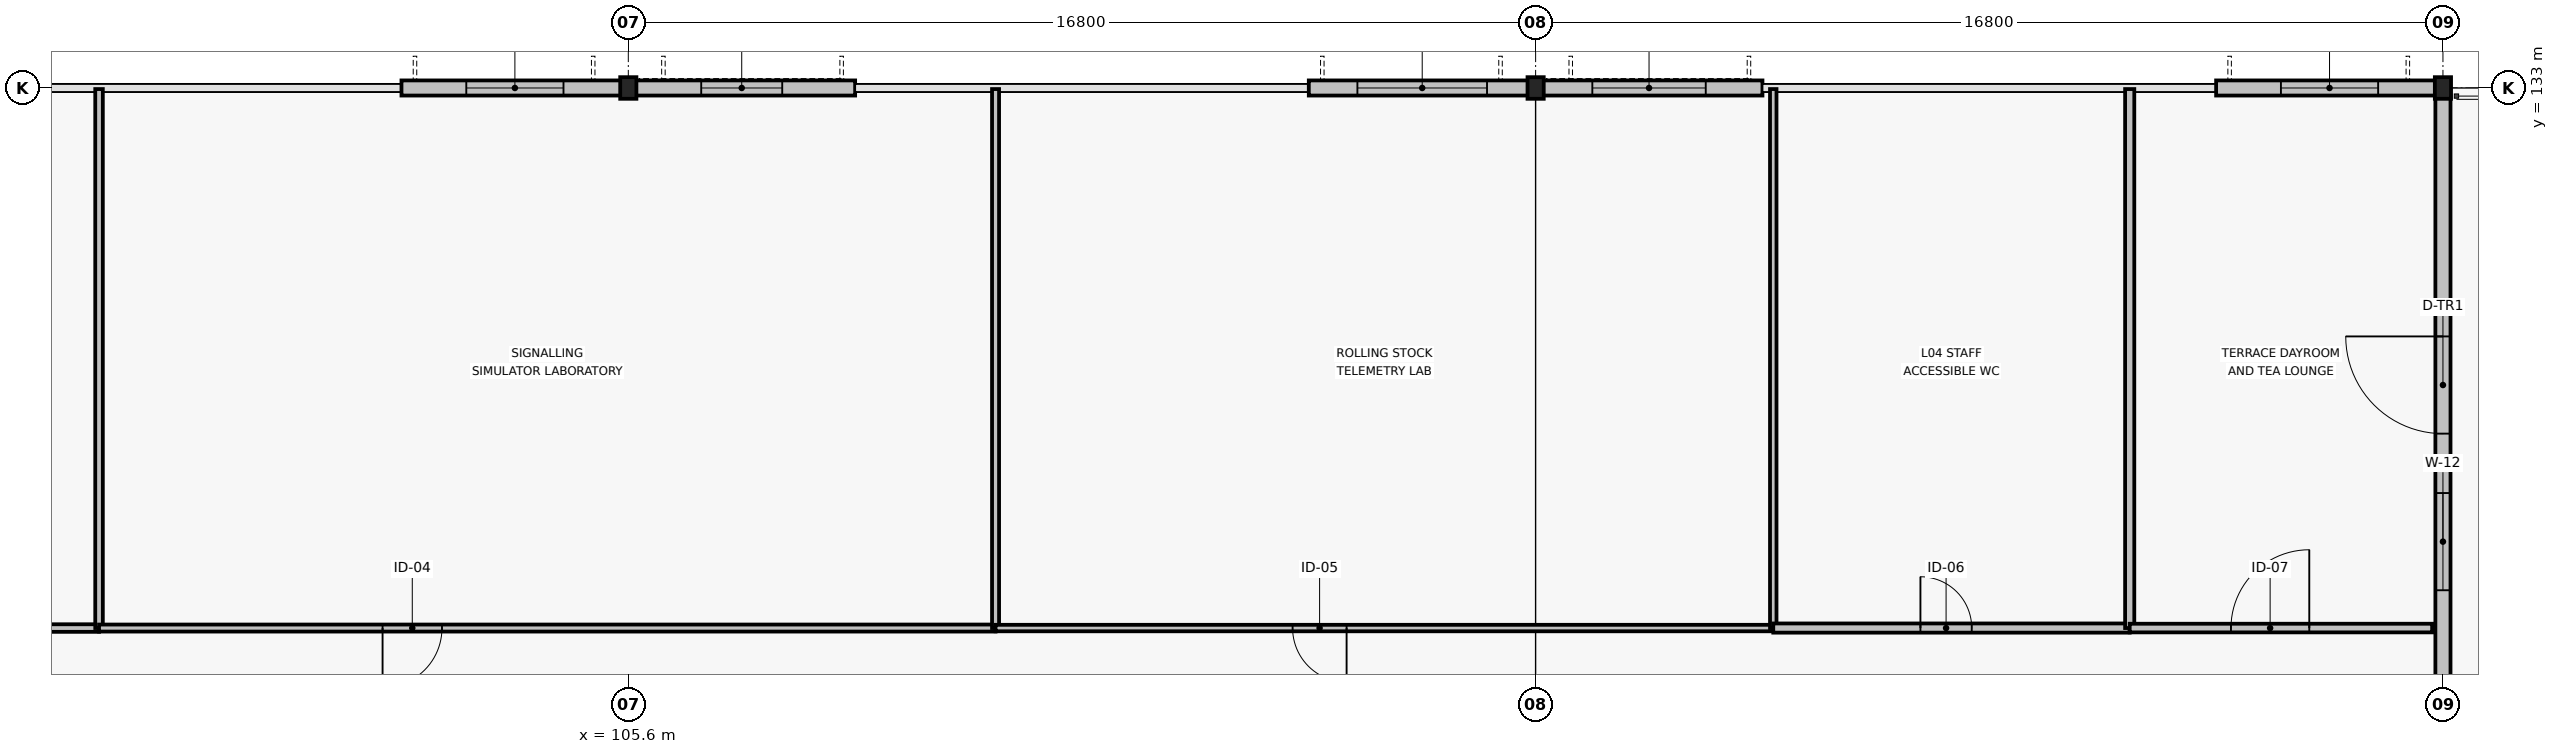
"""IFC4 building model, lengths in metres.
Left out: names, types, materials, properties, quantities, classifications, styles, units other than length and angle.
Written with IfcOpenShell. Run it as: python <this file> out.ifc"""

import sys

from ifc_helpers import new_model, si_unit, direction, frame, frame_2d, origin, origin_2d, place, context, subcontext, project, spatial, rectangle, i_section, extrude, element, fill, save


model = new_model("IFC4")
c1 = context("Model", 3, precision=1e-05, world=origin(), true_north=direction((0.0, 1.0)))
c2 = subcontext(c1, "Body", "Model", "MODEL_VIEW")
j1 = project(units=[si_unit("LENGTHUNIT", "METRE"), si_unit("PLANEANGLEUNIT", "RADIAN")], contexts=[c1])
p1 = place(None, origin())
s1 = spatial("IfcSite", under=j1, at=p1, CompositionType="ELEMENT")
p2 = place(p1, origin())
s2 = spatial("IfcBuilding", under=s1, at=p2, CompositionType="ELEMENT")
p3 = place(p2, frame((0.0, 0.0, 21.0)))
s3 = spatial("IfcBuildingStorey", under=s2, at=p3, CompositionType="ELEMENT", Elevation=21.0)
for number, where, z_axis, x_axis in (
    (1, (105.6, 133.0, 0.0), (0.0, 0.0, 1.0), (1.0, 0.0, 0.0)),
    (2, (122.4, 133.0, 0.0), (0.0, 0.0, 1.0), (1.0, 0.0, 0.0)),
    (3, (139.2, 133.0, 0.0), (0.0, 0.0, 1.0), (1.0, 0.0, 0.0)),
):
    element("IfcColumn", number, at=place(p3, frame(where, z_axis=z_axis, x_axis=x_axis)), inside=s3, PredefinedType="COLUMN", context=c2, shape_type="SweptSolid", body=[
        extrude(i_section(OverallWidth=0.3, OverallDepth=0.4, WebThickness=0.013, FlangeThickness=0.024, FilletRadius=0.027, at=origin_2d()), origin(), (0.0, 0.0, 1.0), 3.9),
    ])
p4 = place(p3, frame((101.4, 133.0, 0.0), z_axis=(0.0, 0.0, 1.0), x_axis=(1.0, 0.0, 0.0)))
e4 = element("IfcWall", 4, at=p4, inside=s3, PredefinedType="STANDARD", context=c2, shape_type="SweptSolid", body=[
    extrude(rectangle(XDim=4.2, YDim=0.28, at=frame_2d((2.1, 0.0))), origin(), (0.0, 0.0, 1.0), 3.315),
])
p5 = place(p4, frame((1.2, 0.0, 0.8)))
e5 = element("IfcOpeningElement", 5, at=p5, cuts=e4, PredefinedType="OPENING", context=c2, shape_type="SweptSolid", body=[
    extrude(rectangle(XDim=1.8, YDim=2.05, at=frame_2d((0.9, 1.025))), frame((0.0, 0.15, 0.0), z_axis=(0.0, -1.0, 0.0), x_axis=(1.0, 0.0, 0.0)), (0.0, 0.0, 1.0), 0.3),
])
p6 = place(p3, frame((105.6, 133.0, 0.0), z_axis=(0.0, 0.0, 1.0), x_axis=(1.0, 0.0, 0.0)))
e6 = element("IfcWall", 6, at=p6, inside=s3, PredefinedType="STANDARD", context=c2, shape_type="SweptSolid", body=[
    extrude(rectangle(XDim=4.2, YDim=0.28, at=frame_2d((2.1, 0.0))), origin(), (0.0, 0.0, 1.0), 3.315),
])
p7 = place(p6, frame((1.35, 0.0, 0.8)))
e7 = element("IfcOpeningElement", 7, at=p7, cuts=e6, PredefinedType="OPENING", context=c2, shape_type="SweptSolid", body=[
    extrude(rectangle(XDim=1.5, YDim=2.05, at=frame_2d((0.75, 1.025))), frame((0.0, 0.15, 0.0), z_axis=(0.0, -1.0, 0.0), x_axis=(1.0, 0.0, 0.0)), (0.0, 0.0, 1.0), 0.3),
])
p8 = place(p3, frame((118.2, 133.0, 0.0), z_axis=(0.0, 0.0, 1.0), x_axis=(1.0, 0.0, 0.0)))
e8 = element("IfcWall", 8, at=p8, inside=s3, PredefinedType="STANDARD", context=c2, shape_type="SweptSolid", body=[
    extrude(rectangle(XDim=4.2, YDim=0.28, at=frame_2d((2.1, 0.0))), origin(), (0.0, 0.0, 1.0), 3.315),
])
p9 = place(p8, frame((0.9, 0.0, 0.8)))
e9 = element("IfcOpeningElement", 9, at=p9, cuts=e8, PredefinedType="OPENING", context=c2, shape_type="SweptSolid", body=[
    extrude(rectangle(XDim=2.4, YDim=1.9, at=frame_2d((1.2, 0.95))), frame((0.0, 0.15, 0.0), z_axis=(0.0, -1.0, 0.0), x_axis=(1.0, 0.0, 0.0)), (0.0, 0.0, 1.0), 0.3),
])
p10 = place(p3, frame((122.4, 133.0, 0.0), z_axis=(0.0, 0.0, 1.0), x_axis=(1.0, 0.0, 0.0)))
e10 = element("IfcWall", 10, at=p10, inside=s3, PredefinedType="STANDARD", context=c2, shape_type="SweptSolid", body=[
    extrude(rectangle(XDim=4.2, YDim=0.28, at=frame_2d((2.1, 0.0))), origin(), (0.0, 0.0, 1.0), 3.315),
])
p11 = place(p10, frame((1.05, 0.0, 0.8)))
e11 = element("IfcOpeningElement", 11, at=p11, cuts=e10, PredefinedType="OPENING", context=c2, shape_type="SweptSolid", body=[
    extrude(rectangle(XDim=2.1, YDim=1.9, at=frame_2d((1.05, 0.95))), frame((0.0, 0.15, 0.0), z_axis=(0.0, -1.0, 0.0), x_axis=(1.0, 0.0, 0.0)), (0.0, 0.0, 1.0), 0.3),
])
p12 = place(p3, frame((135.0, 133.0, 0.0), z_axis=(0.0, 0.0, 1.0), x_axis=(1.0, 0.0, 0.0)))
e12 = element("IfcWall", 12, at=p12, inside=s3, PredefinedType="STANDARD", context=c2, shape_type="SweptSolid", body=[
    extrude(rectangle(XDim=4.2, YDim=0.28, at=frame_2d((2.1, 0.0))), origin(), (0.0, 0.0, 1.0), 3.315),
])
p13 = place(p12, frame((1.2, 0.0, 0.8)))
e13 = element("IfcOpeningElement", 13, at=p13, cuts=e12, PredefinedType="OPENING", context=c2, shape_type="SweptSolid", body=[
    extrude(rectangle(XDim=1.8, YDim=1.9, at=frame_2d((0.9, 0.95))), frame((0.0, 0.15, 0.0), z_axis=(0.0, -1.0, 0.0), x_axis=(1.0, 0.0, 0.0)), (0.0, 0.0, 1.0), 0.3),
])
p14 = place(p3, frame((139.2, 121.5, 0.0), z_axis=(0.0, 0.0, 1.0), x_axis=(0.0, 1.0, 0.0)))
e14 = element("IfcWall", 14, at=p14, inside=s3, PredefinedType="STANDARD", context=c2, shape_type="SweptSolid", body=[
    extrude(rectangle(XDim=11.36, YDim=0.28, at=frame_2d((5.68, 0.0))), origin(), (0.0, 0.0, 1.0), 3.315),
])
p15 = place(p14, frame((6.9, 0.0, 0.0), z_axis=(0.0, 0.0, 1.0), x_axis=(-1.0, 0.0, 0.0)))
e15 = element("IfcOpeningElement", 15, at=p15, cuts=e14, PredefinedType="OPENING", context=c2, shape_type="SweptSolid", body=[
    extrude(rectangle(XDim=1.8, YDim=2.35, at=frame_2d((0.9, 1.175))), frame((0.0, 0.15, 0.0), z_axis=(0.0, -1.0, 0.0), x_axis=(1.0, 0.0, 0.0)), (0.0, 0.0, 1.0), 0.3),
])
p16 = place(p14, frame((2.2, 0.0, 0.85)))
e16 = element("IfcOpeningElement", 16, at=p16, cuts=e14, PredefinedType="OPENING", context=c2, shape_type="SweptSolid", body=[
    extrude(rectangle(XDim=1.8, YDim=1.75, at=frame_2d((0.9, 0.875))), frame((0.0, 0.15, 0.0), z_axis=(0.0, -1.0, 0.0), x_axis=(1.0, 0.0, 0.0)), (0.0, 0.0, 1.0), 0.3),
])
p17 = place(p3, frame((75.2, 123.0, 0.0), z_axis=(0.0, 0.0, 1.0), x_axis=(1.0, 0.0, 0.0)))
e17 = element("IfcWall", 17, at=p17, inside=s3, PredefinedType="PARTITIONING", context=c2, shape_type="SweptSolid", body=[
    extrude(rectangle(XDim=20.6, YDim=0.14, at=frame_2d((10.3, 0.0))), origin(), (0.0, 0.0, 1.0), 3.71),
])
p18 = place(p17, frame((8.2, 0.0, 0.0)))
e18 = element("IfcOpeningElement", 18, at=p18, cuts=e17, PredefinedType="OPENING", context=c2, shape_type="SweptSolid", body=[
    extrude(rectangle(XDim=1.2, YDim=2.2, at=frame_2d((0.6, 1.1))), frame((0.0, 0.08, 0.0), z_axis=(0.0, -1.0, 0.0), x_axis=(1.0, 0.0, 0.0)), (0.0, 0.0, 1.0), 0.16),
])
p19 = place(p3, frame((95.8, 123.0, 0.0), z_axis=(0.0, 0.0, 1.0), x_axis=(0.0, 1.0, 0.0)))
e19 = element("IfcWall", 19, at=p19, inside=s3, PredefinedType="PARTITIONING", context=c2, shape_type="SweptSolid", body=[
    extrude(rectangle(XDim=9.98, YDim=0.14, at=frame_2d((4.99, 0.0))), origin(), (0.0, 0.0, 1.0), 3.71),
])
p20 = place(p3, frame((95.8, 123.0, 0.0), z_axis=(0.0, 0.0, 1.0), x_axis=(1.0, 0.0, 0.0)))
e20 = element("IfcWall", 20, at=p20, inside=s3, PredefinedType="PARTITIONING", context=c2, shape_type="SweptSolid", body=[
    extrude(rectangle(XDim=16.6, YDim=0.13, at=frame_2d((8.3, 0.0))), origin(), (0.0, 0.0, 1.0), 3.71),
])
p21 = place(p20, frame((6.35, 0.0, 0.0), z_axis=(0.0, 0.0, 1.0), x_axis=(-1.0, 0.0, 0.0)))
e21 = element("IfcOpeningElement", 21, at=p21, cuts=e20, PredefinedType="OPENING", context=c2, shape_type="SweptSolid", body=[
    extrude(rectangle(XDim=1.1, YDim=2.15, at=frame_2d((0.55, 1.075))), frame((0.0, 0.075, 0.0), z_axis=(0.0, -1.0, 0.0), x_axis=(1.0, 0.0, 0.0)), (0.0, 0.0, 1.0), 0.15),
])
p22 = place(p3, frame((112.4, 123.0, 0.0), z_axis=(0.0, 0.0, 1.0), x_axis=(0.0, 1.0, 0.0)))
e22 = element("IfcWall", 22, at=p22, inside=s3, PredefinedType="PARTITIONING", context=c2, shape_type="SweptSolid", body=[
    extrude(rectangle(XDim=9.98, YDim=0.13, at=frame_2d((4.99, 0.0))), origin(), (0.0, 0.0, 1.0), 3.71),
])
p23 = place(p3, frame((112.4, 123.0, 0.0), z_axis=(0.0, 0.0, 1.0), x_axis=(1.0, 0.0, 0.0)))
e23 = element("IfcWall", 23, at=p23, inside=s3, PredefinedType="PARTITIONING", context=c2, shape_type="SweptSolid", body=[
    extrude(rectangle(XDim=14.4, YDim=0.12, at=frame_2d((7.2, 0.0))), origin(), (0.0, 0.0, 1.0), 3.71),
])
p24 = place(p23, frame((5.5, 0.0, 0.0)))
e24 = element("IfcOpeningElement", 24, at=p24, cuts=e23, PredefinedType="OPENING", context=c2, shape_type="SweptSolid", body=[
    extrude(rectangle(XDim=1.0, YDim=2.15, at=frame_2d((0.5, 1.075))), frame((0.0, 0.07, 0.0), z_axis=(0.0, -1.0, 0.0), x_axis=(1.0, 0.0, 0.0)), (0.0, 0.0, 1.0), 0.14),
])
p25 = place(p3, frame((126.8, 123.0, 0.0), z_axis=(0.0, 0.0, 1.0), x_axis=(0.0, 1.0, 0.0)))
e25 = element("IfcWall", 25, at=p25, inside=s3, PredefinedType="PARTITIONING", context=c2, shape_type="SweptSolid", body=[
    extrude(rectangle(XDim=9.98, YDim=0.12, at=frame_2d((4.99, 0.0))), origin(), (0.0, 0.0, 1.0), 3.71),
])
p26 = place(p3, frame((126.8, 123.0, 0.0), z_axis=(0.0, 0.0, 1.0), x_axis=(1.0, 0.0, 0.0)))
e26 = element("IfcWall", 26, at=p26, inside=s3, PredefinedType="PLUMBINGWALL", context=c2, shape_type="SweptSolid", body=[
    extrude(rectangle(XDim=6.6, YDim=0.17, at=frame_2d((3.3, 0.0))), origin(), (0.0, 0.0, 1.0), 3.71),
])
p27 = place(p26, frame((2.725, 0.0, 0.0)))
e27 = element("IfcOpeningElement", 27, at=p27, cuts=e26, PredefinedType="OPENING", context=c2, shape_type="SweptSolid", body=[
    extrude(rectangle(XDim=0.95, YDim=2.15, at=frame_2d((0.475, 1.075))), frame((0.0, 0.095, 0.0), z_axis=(0.0, -1.0, 0.0), x_axis=(1.0, 0.0, 0.0)), (0.0, 0.0, 1.0), 0.19),
])
p28 = place(p3, frame((133.4, 123.0, 0.0), z_axis=(0.0, 0.0, 1.0), x_axis=(0.0, 1.0, 0.0)))
e28 = element("IfcWall", 28, at=p28, inside=s3, PredefinedType="PLUMBINGWALL", context=c2, shape_type="SweptSolid", body=[
    extrude(rectangle(XDim=9.98, YDim=0.17, at=frame_2d((4.99, 0.0))), origin(), (0.0, 0.0, 1.0), 3.375),
])
p29 = place(p3, frame((133.4, 123.0, 0.0), z_axis=(0.0, 0.0, 1.0), x_axis=(1.0, 0.0, 0.0)))
e29 = element("IfcWall", 29, at=p29, inside=s3, PredefinedType="PARTITIONING", context=c2, shape_type="SweptSolid", body=[
    extrude(rectangle(XDim=5.6, YDim=0.16, at=frame_2d((2.8, 0.0))), origin(), (0.0, 0.0, 1.0), 3.71),
])
p30 = place(p29, frame((3.325, 0.0, 0.0), z_axis=(0.0, 0.0, 1.0), x_axis=(-1.0, 0.0, 0.0)))
e30 = element("IfcOpeningElement", 30, at=p30, cuts=e29, PredefinedType="OPENING", context=c2, shape_type="SweptSolid", body=[
    extrude(rectangle(XDim=1.45, YDim=2.25, at=frame_2d((0.725, 1.125))), frame((0.0, 0.09, 0.0), z_axis=(0.0, -1.0, 0.0), x_axis=(1.0, 0.0, 0.0)), (0.0, 0.0, 1.0), 0.18),
])
p31 = place(p5, origin())
e31 = element("IfcWindow", 31, at=p31, inside=s3, PartitioningType="SINGLE_PANEL", PredefinedType="WINDOW", context=c2, shape_type="SweptSolid", body=[
    extrude(rectangle(XDim=1.8, YDim=2.05, at=frame_2d((0.9, 1.025))), frame((0.0, 0.03, 0.0), z_axis=(0.0, -1.0, 0.0), x_axis=(1.0, 0.0, 0.0)), (0.0, 0.0, 1.0), 0.06),
])
fill(e5, e31)
p32 = place(p7, origin())
e32 = element("IfcWindow", 32, at=p32, inside=s3, PartitioningType="SINGLE_PANEL", PredefinedType="WINDOW", context=c2, shape_type="SweptSolid", body=[
    extrude(rectangle(XDim=1.5, YDim=2.05, at=frame_2d((0.75, 1.025))), frame((0.0, 0.03, 0.0), z_axis=(0.0, -1.0, 0.0), x_axis=(1.0, 0.0, 0.0)), (0.0, 0.0, 1.0), 0.06),
])
fill(e7, e32)
p33 = place(p9, origin())
e33 = element("IfcWindow", 33, at=p33, inside=s3, PartitioningType="SINGLE_PANEL", PredefinedType="WINDOW", context=c2, shape_type="SweptSolid", body=[
    extrude(rectangle(XDim=2.4, YDim=1.9, at=frame_2d((1.2, 0.95))), frame((0.0, 0.03, 0.0), z_axis=(0.0, -1.0, 0.0), x_axis=(1.0, 0.0, 0.0)), (0.0, 0.0, 1.0), 0.06),
])
fill(e9, e33)
p34 = place(p11, origin())
e34 = element("IfcWindow", 34, at=p34, inside=s3, PartitioningType="SINGLE_PANEL", PredefinedType="WINDOW", context=c2, shape_type="SweptSolid", body=[
    extrude(rectangle(XDim=2.1, YDim=1.9, at=frame_2d((1.05, 0.95))), frame((0.0, 0.03, 0.0), z_axis=(0.0, -1.0, 0.0), x_axis=(1.0, 0.0, 0.0)), (0.0, 0.0, 1.0), 0.06),
])
fill(e11, e34)
p35 = place(p13, origin())
e35 = element("IfcWindow", 35, at=p35, inside=s3, PartitioningType="SINGLE_PANEL", PredefinedType="WINDOW", context=c2, shape_type="SweptSolid", body=[
    extrude(rectangle(XDim=1.8, YDim=1.9, at=frame_2d((0.9, 0.95))), frame((0.0, 0.03, 0.0), z_axis=(0.0, -1.0, 0.0), x_axis=(1.0, 0.0, 0.0)), (0.0, 0.0, 1.0), 0.06),
])
fill(e13, e35)
p36 = place(p15, origin())
e36 = element("IfcDoor", 36, at=p36, inside=s3, OperationType="SINGLE_SWING_RIGHT", PredefinedType="DOOR", context=c2, shape_type="SweptSolid", body=[
    extrude(rectangle(XDim=1.8, YDim=2.35, at=frame_2d((0.9, 1.175))), frame((0.0, 0.025, 0.0), z_axis=(0.0, -1.0, 0.0), x_axis=(1.0, 0.0, 0.0)), (0.0, 0.0, 1.0), 0.05),
])
fill(e15, e36)
p37 = place(p16, origin())
e37 = element("IfcWindow", 37, at=p37, inside=s3, PartitioningType="SINGLE_PANEL", PredefinedType="WINDOW", context=c2, shape_type="SweptSolid", body=[
    extrude(rectangle(XDim=1.8, YDim=1.75, at=frame_2d((0.9, 0.875))), frame((0.0, 0.03, 0.0), z_axis=(0.0, -1.0, 0.0), x_axis=(1.0, 0.0, 0.0)), (0.0, 0.0, 1.0), 0.06),
])
fill(e16, e37)
p38 = place(p21, origin())
e38 = element("IfcDoor", 38, at=p38, inside=s3, OperationType="SINGLE_SWING_LEFT", PredefinedType="DOOR", context=c2, shape_type="SweptSolid", body=[
    extrude(rectangle(XDim=1.1, YDim=2.15, at=frame_2d((0.55, 1.075))), frame((0.0, 0.025, 0.0), z_axis=(0.0, -1.0, 0.0), x_axis=(1.0, 0.0, 0.0)), (0.0, 0.0, 1.0), 0.05),
])
fill(e21, e38)
p39 = place(p24, origin())
e39 = element("IfcDoor", 39, at=p39, inside=s3, OperationType="SINGLE_SWING_RIGHT", PredefinedType="DOOR", context=c2, shape_type="SweptSolid", body=[
    extrude(rectangle(XDim=1.0, YDim=2.15, at=frame_2d((0.5, 1.075))), frame((0.0, 0.025, 0.0), z_axis=(0.0, -1.0, 0.0), x_axis=(1.0, 0.0, 0.0)), (0.0, 0.0, 1.0), 0.05),
])
fill(e24, e39)
p40 = place(p27, origin())
e40 = element("IfcDoor", 40, at=p40, inside=s3, OperationType="SINGLE_SWING_LEFT", PredefinedType="DOOR", context=c2, shape_type="SweptSolid", body=[
    extrude(rectangle(XDim=0.95, YDim=2.15, at=frame_2d((0.475, 1.075))), frame((0.0, 0.025, 0.0), z_axis=(0.0, -1.0, 0.0), x_axis=(1.0, 0.0, 0.0)), (0.0, 0.0, 1.0), 0.05),
])
fill(e27, e40)
p41 = place(p30, origin())
e41 = element("IfcDoor", 41, at=p41, inside=s3, OperationType="SINGLE_SWING_RIGHT", PredefinedType="DOOR", context=c2, shape_type="SweptSolid", body=[
    extrude(rectangle(XDim=1.45, YDim=2.25, at=frame_2d((0.725, 1.125))), frame((0.0, 0.025, 0.0), z_axis=(0.0, -1.0, 0.0), x_axis=(1.0, 0.0, 0.0)), (0.0, 0.0, 1.0), 0.05),
])
fill(e30, e41)
save(model, sys.argv[1])
